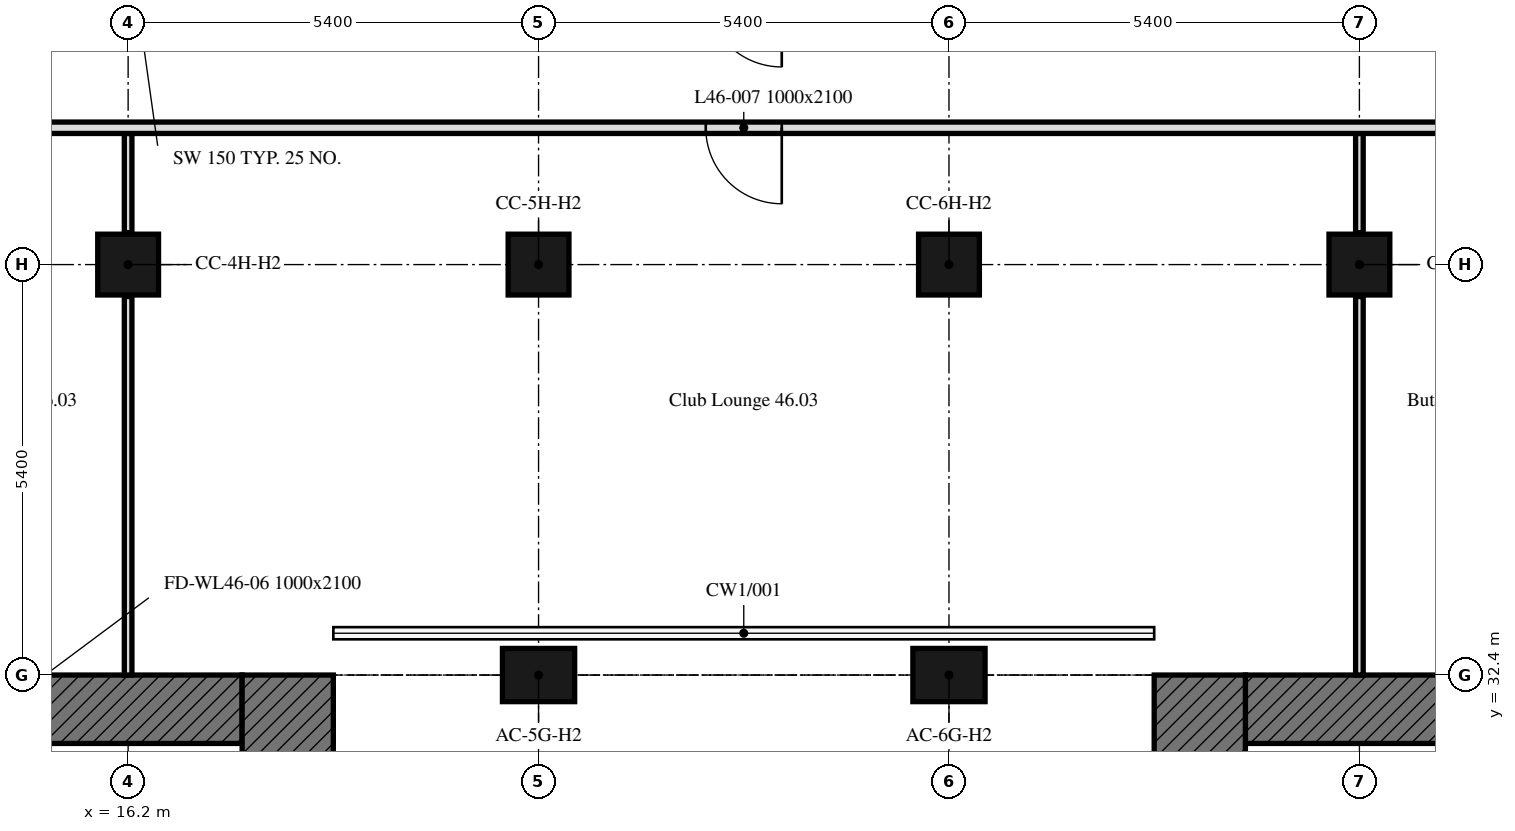
"""IFC4 building model, lengths in metres.
Left out: names, types, materials, properties, quantities, classifications, styles, units other than length and angle.
Written with IfcOpenShell. Run it as: python <this file> out.ifc"""

import sys

from ifc_helpers import new_model, si_unit, direction, frame, frame_2d, origin, origin_2d, place, context, subcontext, project, spatial, rectangle, extrude, element, fill, save


model = new_model("IFC4")
c1 = context("Model", 3, precision=1e-05, world=origin(), true_north=direction((0.0, 1.0)))
c2 = subcontext(c1, "Body", "Model", "MODEL_VIEW")
j1 = project(units=[si_unit("LENGTHUNIT", "METRE"), si_unit("PLANEANGLEUNIT", "RADIAN")], contexts=[c1])
p1 = place(None, origin())
s1 = spatial("IfcSite", under=j1, at=p1, CompositionType="ELEMENT")
p2 = place(p1, origin())
s2 = spatial("IfcBuilding", under=s1, at=p2, CompositionType="ELEMENT")
p3 = place(p2, frame((0.0, 0.0, 190.6)))
s3 = spatial("IfcBuildingStorey", under=s2, at=p3, CompositionType="ELEMENT", Elevation=190.6)
for number, where, z_axis, x_axis in (
    (1, (21.6, 32.4, 0.0), (0.0, 0.0, 1.0), (1.0, 0.0, 0.0)),
    (2, (27.0, 32.4, 0.0), (0.0, 0.0, 1.0), (1.0, 0.0, 0.0)),
):
    element("IfcColumn", number, at=place(p3, frame(where, z_axis=z_axis, x_axis=x_axis)), inside=s3, PredefinedType="COLUMN", context=c2, shape_type="SweptSolid", body=[
        extrude(rectangle(XDim=0.95, YDim=0.7, at=origin_2d()), origin(), (0.0, 0.0, 1.0), 3.0),
    ])
for number, where, z_axis, x_axis in (
    (3, (16.2, 37.8, 0.0), (0.0, 0.0, 1.0), (1.0, 0.0, 0.0)),
    (4, (21.6, 37.8, 0.0), (0.0, 0.0, 1.0), (1.0, 0.0, 0.0)),
    (5, (27.0, 37.8, 0.0), (0.0, 0.0, 1.0), (1.0, 0.0, 0.0)),
    (6, (32.4, 37.8, 0.0), (0.0, 0.0, 1.0), (1.0, 0.0, 0.0)),
):
    element("IfcColumn", number, at=place(p3, frame(where, z_axis=z_axis, x_axis=x_axis)), inside=s3, PredefinedType="COLUMN", context=c2, shape_type="SweptSolid", body=[
        extrude(rectangle(XDim=0.8, YDim=0.8, at=origin_2d()), origin(), (0.0, 0.0, 1.0), 3.0),
    ])
p4 = place(p3, frame((6.6, 31.95, 0.0), z_axis=(0.0, 0.0, 1.0), x_axis=(1.0, 0.0, 0.0)))
e7 = element("IfcWall", 7, at=p4, inside=s3, PredefinedType="SOLIDWALL", context=c2, shape_type="SweptSolid", body=[
    extrude(rectangle(XDim=11.1, YDim=0.9, at=frame_2d((5.55, 0.0))), origin(), (0.0, 0.0, 1.0), 3.0),
])
p5 = place(p4, frame((3.55, 0.0, 0.0)))
e8 = element("IfcOpeningElement", 8, at=p5, cuts=e7, PredefinedType="OPENING", context=c2, shape_type="SweptSolid", body=[
    extrude(rectangle(XDim=2.0, YDim=2.4, at=frame_2d((1.0, 1.2))), frame((0.0, 0.45, 0.0), z_axis=(0.0, -1.0, 0.0), x_axis=(1.0, 0.0, 0.0)), (0.0, 0.0, 1.0), 0.9),
])
p6 = place(p3, frame((18.3, 32.4, 0.0), z_axis=(0.0, 0.0, 1.0), x_axis=(0.0, -1.0, 0.0)))
e9 = element("IfcWall", 9, at=p6, inside=s3, PredefinedType="SOLIDWALL", context=c2, shape_type="SweptSolid", body=[
    extrude(rectangle(XDim=16.2, YDim=1.2, at=frame_2d((8.1, 0.0))), origin(), (0.0, 0.0, 1.0), 3.0),
])
p7 = place(p3, frame((30.9, 31.95, 0.0), z_axis=(0.0, 0.0, 1.0), x_axis=(1.0, 0.0, 0.0)))
e10 = element("IfcWall", 10, at=p7, inside=s3, PredefinedType="SOLIDWALL", context=c2, shape_type="SweptSolid", body=[
    extrude(rectangle(XDim=11.1, YDim=0.9, at=frame_2d((5.55, 0.0))), origin(), (0.0, 0.0, 1.0), 3.0),
])
p8 = place(p7, frame((5.55, 0.0, 0.0)))
e11 = element("IfcOpeningElement", 11, at=p8, cuts=e10, PredefinedType="OPENING", context=c2, shape_type="SweptSolid", body=[
    extrude(rectangle(XDim=2.0, YDim=2.4, at=frame_2d((1.0, 1.2))), frame((0.0, 0.45, 0.0), z_axis=(0.0, -1.0, 0.0), x_axis=(1.0, 0.0, 0.0)), (0.0, 0.0, 1.0), 0.9),
])
p9 = place(p3, frame((30.3, 16.2, 0.0), z_axis=(0.0, 0.0, 1.0), x_axis=(0.0, 1.0, 0.0)))
e12 = element("IfcWall", 12, at=p9, inside=s3, PredefinedType="SOLIDWALL", context=c2, shape_type="SweptSolid", body=[
    extrude(rectangle(XDim=16.2, YDim=1.2, at=frame_2d((8.1, 0.0))), origin(), (0.0, 0.0, 1.0), 3.0),
])
p10 = place(p3, frame((16.2, 39.525, 0.0), z_axis=(0.0, 0.0, 1.0), x_axis=(0.0, -1.0, 0.0)))
e13 = element("IfcWall", 13, at=p10, inside=s3, PredefinedType="PARTITIONING", context=c2, shape_type="SweptSolid", body=[
    extrude(rectangle(XDim=1.305, YDim=0.1, at=frame_2d((0.652, 0.0))), origin(), (0.0, 0.0, 1.0), 2.4),
])
for number, where, z_axis, x_axis in (
    (14, (16.2, 37.38, 0.0), (0.0, 0.0, 1.0), (0.0, -1.0, 0.0)),
    (15, (32.4, 32.4, 0.0), (0.0, 0.0, 1.0), (0.0, 1.0, 0.0)),
):
    element("IfcWall", number, at=place(p3, frame(where, z_axis=z_axis, x_axis=x_axis)), inside=s3, PredefinedType="PARTITIONING", context=c2, shape_type="SweptSolid", body=[
        extrude(rectangle(XDim=4.98, YDim=0.1, at=frame_2d((2.49, 0.0))), origin(), (0.0, 0.0, 1.0), 2.4),
    ])
p11 = place(p3, frame((32.4, 38.22, 0.0), z_axis=(0.0, 0.0, 1.0), x_axis=(0.0, 1.0, 0.0)))
e16 = element("IfcWall", 16, at=p11, inside=s3, PredefinedType="PARTITIONING", context=c2, shape_type="SweptSolid", body=[
    extrude(rectangle(XDim=1.305, YDim=0.1, at=frame_2d((0.652, 0.0))), origin(), (0.0, 0.0, 1.0), 2.4),
])
p12 = place(p3, frame((43.275, 39.6, 0.0), z_axis=(0.0, 0.0, 1.0), x_axis=(-1.0, 0.0, 0.0)))
e17 = element("IfcWall", 17, at=p12, inside=s3, PredefinedType="PARTITIONING", context=c2, shape_type="SweptSolid", body=[
    extrude(rectangle(XDim=36.049, YDim=0.15, at=frame_2d((18.024, 0.0))), origin(), (0.0, 0.0, 1.0), 2.4),
])
p13 = place(p12, frame((18.475, 0.0, 0.0)))
e18 = element("IfcOpeningElement", 18, at=p13, cuts=e17, PredefinedType="OPENING", context=c2, shape_type="SweptSolid", body=[
    extrude(rectangle(XDim=1.0, YDim=2.1, at=frame_2d((0.5, 1.05))), frame((0.0, 0.075, 0.0), z_axis=(0.0, -1.0, 0.0), x_axis=(1.0, 0.0, 0.0)), (0.0, 0.0, 1.0), 0.15),
])
p14 = place(p12, frame((34.799, 0.0, 0.0)))
e19 = element("IfcOpeningElement", 19, at=p14, cuts=e17, PredefinedType="OPENING", context=c2, shape_type="SweptSolid", body=[
    extrude(rectangle(XDim=1.0, YDim=2.1, at=frame_2d((0.5, 1.05))), frame((0.0, 0.075, 0.0), z_axis=(0.0, -1.0, 0.0), x_axis=(1.0, 0.0, 0.0)), (0.0, 0.0, 1.0), 0.15),
])
p15 = place(p12, frame((7.925, 0.0, 0.0)))
e20 = element("IfcOpeningElement", 20, at=p15, cuts=e17, PredefinedType="OPENING", context=c2, shape_type="SweptSolid", body=[
    extrude(rectangle(XDim=1.0, YDim=2.1, at=frame_2d((0.5, 1.05))), frame((0.0, 0.075, 0.0), z_axis=(0.0, -1.0, 0.0), x_axis=(1.0, 0.0, 0.0)), (0.0, 0.0, 1.0), 0.15),
])
p16 = place(p12, frame((29.025, 0.0, 0.0)))
e21 = element("IfcOpeningElement", 21, at=p16, cuts=e17, PredefinedType="OPENING", context=c2, shape_type="SweptSolid", body=[
    extrude(rectangle(XDim=1.0, YDim=2.1, at=frame_2d((0.5, 1.05))), frame((0.0, 0.075, 0.0), z_axis=(0.0, -1.0, 0.0), x_axis=(1.0, 0.0, 0.0)), (0.0, 0.0, 1.0), 0.15),
])
p17 = place(p12, frame((30.495, 0.0, 0.0)))
e22 = element("IfcOpeningElement", 22, at=p17, cuts=e17, PredefinedType="OPENING", context=c2, shape_type="SweptSolid", body=[
    extrude(rectangle(XDim=1.8, YDim=2.4, at=frame_2d((0.9, 1.2))), frame((0.0, 0.075, 0.0), z_axis=(0.0, -1.0, 0.0), x_axis=(1.0, 0.0, 0.0)), (0.0, 0.0, 1.0), 0.15),
])
p18 = place(p12, frame((5.925, 0.0, 0.0)))
e23 = element("IfcOpeningElement", 23, at=p18, cuts=e17, PredefinedType="OPENING", context=c2, shape_type="SweptSolid", body=[
    extrude(rectangle(XDim=1.0, YDim=2.1, at=frame_2d((0.5, 1.05))), frame((0.0, 0.075, 0.0), z_axis=(0.0, -1.0, 0.0), x_axis=(1.0, 0.0, 0.0)), (0.0, 0.0, 1.0), 0.15),
])
p19 = place(p13, origin())
e24 = element("IfcDoor", 24, at=p19, inside=s3, OperationType="SINGLE_SWING_RIGHT", PredefinedType="DOOR", context=c2, shape_type="SweptSolid", body=[
    extrude(rectangle(XDim=1.0, YDim=2.1, at=frame_2d((0.5, 1.05))), frame((0.0, 0.025, 0.0), z_axis=(0.0, -1.0, 0.0), x_axis=(1.0, 0.0, 0.0)), (0.0, 0.0, 1.0), 0.05),
])
fill(e18, e24)
save(model, sys.argv[1])
